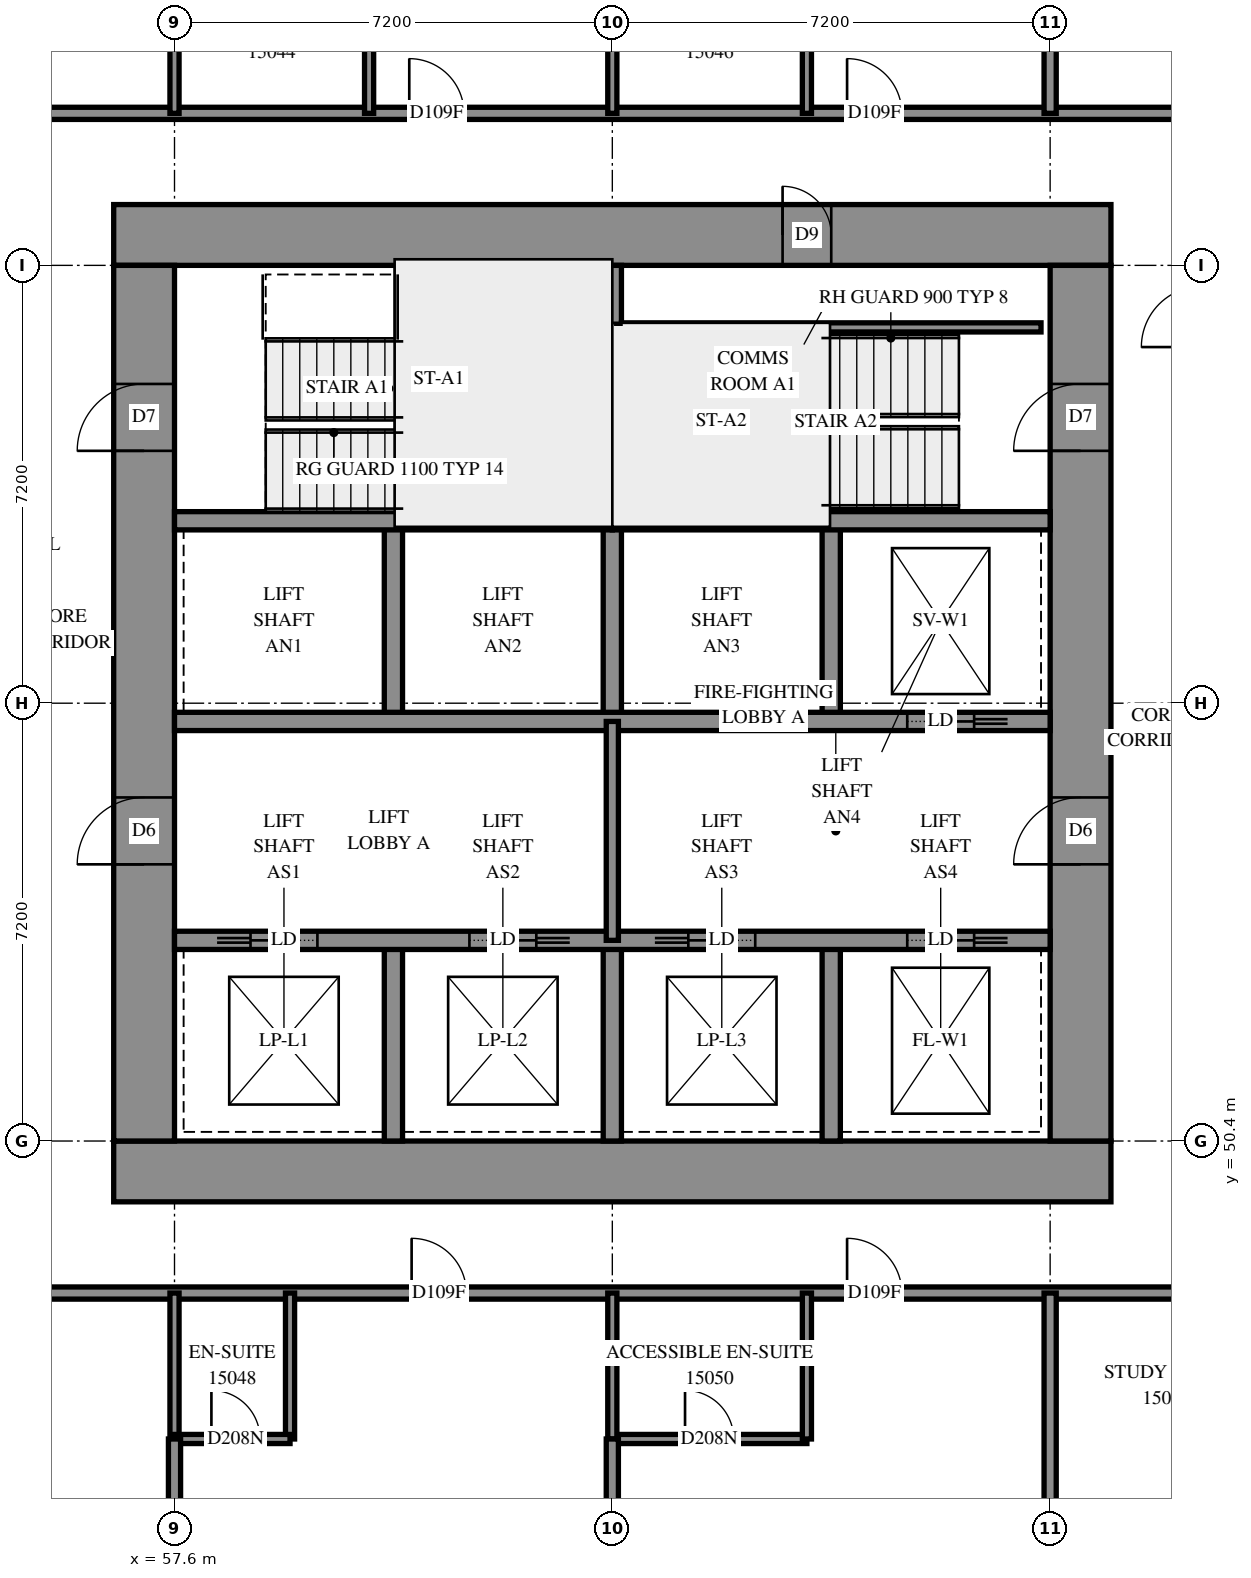
"""IFC4 building model, lengths in metres.
Left out: names, types, materials, properties, quantities, classifications, styles, units other than length and angle.
Written with IfcOpenShell. Run it as: python <this file> out.ifc"""

import sys

from ifc_helpers import new_model, si_unit, direction, frame, frame_2d, origin, place, context, subcontext, project, spatial, rectangle, extrude, element, fill, save


model = new_model("IFC4")
c1 = context("Model", 3, precision=1e-05, world=origin(), true_north=direction((0.0, 1.0)))
c2 = subcontext(c1, "Body", "Model", "MODEL_VIEW")
j1 = project(units=[si_unit("LENGTHUNIT", "METRE"), si_unit("PLANEANGLEUNIT", "RADIAN")], contexts=[c1])
p1 = place(None, origin())
s1 = spatial("IfcSite", under=j1, at=p1, CompositionType="ELEMENT")
p2 = place(p1, origin())
s2 = spatial("IfcBuilding", under=s1, at=p2, CompositionType="ELEMENT")
p3 = place(p2, frame((0.0, 0.0, 57.6)))
s3 = spatial("IfcBuildingStorey", under=s2, at=p3, CompositionType="ELEMENT", Elevation=57.6)
p4 = place(p3, frame((56.6, 49.9, -0.3), z_axis=(0.0, 0.0, 1.0), x_axis=(1.0, 0.0, 0.0)))
e1 = element("IfcWall", 1, at=p4, inside=s3, PredefinedType="SHEAR", context=c2, shape_type="SweptSolid", body=[
    extrude(rectangle(XDim=16.4, YDim=1.0, at=frame_2d((8.2, 0.0))), origin(), (0.0, 0.0, 1.0), 2.7),
])
p5 = place(p3, frame((56.6, 65.3, -0.3), z_axis=(0.0, 0.0, 1.0), x_axis=(1.0, 0.0, 0.0)))
e2 = element("IfcWall", 2, at=p5, inside=s3, PredefinedType="SHEAR", context=c2, shape_type="SweptSolid", body=[
    extrude(rectangle(XDim=16.4, YDim=1.0, at=frame_2d((8.2, 0.0))), origin(), (0.0, 0.0, 1.0), 2.7),
])
p6 = place(p5, frame((11.0, 0.0, 0.3)))
e3 = element("IfcOpeningElement", 3, at=p6, cuts=e2, PredefinedType="OPENING", context=c2, shape_type="SweptSolid", body=[
    extrude(rectangle(XDim=0.8, YDim=2.1, at=frame_2d((0.4, 1.05))), frame((0.0, 0.51, 0.0), z_axis=(0.0, -1.0, 0.0), x_axis=(1.0, 0.0, 0.0)), (0.0, 0.0, 1.0), 1.02),
])
p7 = place(p3, frame((57.1, 50.4, -0.3), z_axis=(0.0, 0.0, 1.0), x_axis=(0.0, 1.0, 0.0)))
e4 = element("IfcWall", 4, at=p7, inside=s3, PredefinedType="SHEAR", context=c2, shape_type="SweptSolid", body=[
    extrude(rectangle(XDim=14.4, YDim=1.0, at=frame_2d((7.2, 0.0))), origin(), (0.0, 0.0, 1.0), 2.7),
])
p8 = place(p7, frame((4.55, 0.0, 0.3)))
e5 = element("IfcOpeningElement", 5, at=p8, cuts=e4, PredefinedType="OPENING", context=c2, shape_type="SweptSolid", body=[
    extrude(rectangle(XDim=1.1, YDim=2.1, at=frame_2d((0.55, 1.05))), frame((0.0, 0.51, 0.0), z_axis=(0.0, -1.0, 0.0), x_axis=(1.0, 0.0, 0.0)), (0.0, 0.0, 1.0), 1.02),
])
p9 = place(p7, frame((11.35, 0.0, 0.3)))
e6 = element("IfcOpeningElement", 6, at=p9, cuts=e4, PredefinedType="OPENING", context=c2, shape_type="SweptSolid", body=[
    extrude(rectangle(XDim=1.1, YDim=2.1, at=frame_2d((0.55, 1.05))), frame((0.0, 0.51, 0.0), z_axis=(0.0, -1.0, 0.0), x_axis=(1.0, 0.0, 0.0)), (0.0, 0.0, 1.0), 1.02),
])
p10 = place(p3, frame((72.5, 50.4, -0.3), z_axis=(0.0, 0.0, 1.0), x_axis=(0.0, 1.0, 0.0)))
e7 = element("IfcWall", 7, at=p10, inside=s3, PredefinedType="SHEAR", context=c2, shape_type="SweptSolid", body=[
    extrude(rectangle(XDim=14.4, YDim=1.0, at=frame_2d((7.2, 0.0))), origin(), (0.0, 0.0, 1.0), 2.7),
])
p11 = place(p10, frame((4.55, 0.0, 0.3)))
e8 = element("IfcOpeningElement", 8, at=p11, cuts=e7, PredefinedType="OPENING", context=c2, shape_type="SweptSolid", body=[
    extrude(rectangle(XDim=1.1, YDim=2.1, at=frame_2d((0.55, 1.05))), frame((0.0, 0.51, 0.0), z_axis=(0.0, -1.0, 0.0), x_axis=(1.0, 0.0, 0.0)), (0.0, 0.0, 1.0), 1.02),
])
p12 = place(p10, frame((11.35, 0.0, 0.3)))
e9 = element("IfcOpeningElement", 9, at=p12, cuts=e7, PredefinedType="OPENING", context=c2, shape_type="SweptSolid", body=[
    extrude(rectangle(XDim=1.1, YDim=2.1, at=frame_2d((0.55, 1.05))), frame((0.0, 0.51, 0.0), z_axis=(0.0, -1.0, 0.0), x_axis=(1.0, 0.0, 0.0)), (0.0, 0.0, 1.0), 1.02),
])
for number, where, z_axis, x_axis in (
    (10, (61.2, 50.4, 0.0), (0.0, 0.0, 1.0), (0.0, 1.0, 0.0)),
    (11, (61.2, 57.3, 0.0), (0.0, 0.0, 1.0), (0.0, 1.0, 0.0)),
    (12, (64.8, 50.4, 0.0), (0.0, 0.0, 1.0), (0.0, 1.0, 0.0)),
    (13, (64.8, 57.3, 0.0), (0.0, 0.0, 1.0), (0.0, 1.0, 0.0)),
    (14, (68.4, 50.4, 0.0), (0.0, 0.0, 1.0), (0.0, 1.0, 0.0)),
    (15, (68.4, 57.3, 0.0), (0.0, 0.0, 1.0), (0.0, 1.0, 0.0)),
):
    element("IfcWall", number, at=place(p3, frame(where, z_axis=z_axis, x_axis=x_axis)), inside=s3, PredefinedType="SOLIDWALL", context=c2, shape_type="SweptSolid", body=[
        extrude(rectangle(XDim=3.3, YDim=0.3, at=frame_2d((1.65, 0.0))), origin(), (0.0, 0.0, 1.0), 3.1),
    ])
p13 = place(p3, frame((57.6, 53.7, 0.0), z_axis=(0.0, 0.0, 1.0), x_axis=(1.0, 0.0, 0.0)))
e16 = element("IfcWall", 16, at=p13, inside=s3, PredefinedType="SOLIDWALL", context=c2, shape_type="SweptSolid", body=[
    extrude(rectangle(XDim=14.4, YDim=0.3, at=frame_2d((7.2, 0.0))), origin(), (0.0, 0.0, 1.0), 3.1),
])
p14 = place(p13, frame((1.25, 0.0, 0.0)))
e17 = element("IfcOpeningElement", 17, at=p14, cuts=e16, PredefinedType="OPENING", context=c2, shape_type="SweptSolid", body=[
    extrude(rectangle(XDim=1.1, YDim=2.1, at=frame_2d((0.55, 1.05))), frame((0.0, 0.16, 0.0), z_axis=(0.0, -1.0, 0.0), x_axis=(1.0, 0.0, 0.0)), (0.0, 0.0, 1.0), 0.32),
])
p15 = place(p13, frame((4.85, 0.0, 0.0)))
e18 = element("IfcOpeningElement", 18, at=p15, cuts=e16, PredefinedType="OPENING", context=c2, shape_type="SweptSolid", body=[
    extrude(rectangle(XDim=1.1, YDim=2.1, at=frame_2d((0.55, 1.05))), frame((0.0, 0.16, 0.0), z_axis=(0.0, -1.0, 0.0), x_axis=(1.0, 0.0, 0.0)), (0.0, 0.0, 1.0), 0.32),
])
p16 = place(p13, frame((8.45, 0.0, 0.0)))
e19 = element("IfcOpeningElement", 19, at=p16, cuts=e16, PredefinedType="OPENING", context=c2, shape_type="SweptSolid", body=[
    extrude(rectangle(XDim=1.1, YDim=2.1, at=frame_2d((0.55, 1.05))), frame((0.0, 0.16, 0.0), z_axis=(0.0, -1.0, 0.0), x_axis=(1.0, 0.0, 0.0)), (0.0, 0.0, 1.0), 0.32),
])
p17 = place(p13, frame((12.05, 0.0, 0.0)))
e20 = element("IfcOpeningElement", 20, at=p17, cuts=e16, PredefinedType="OPENING", context=c2, shape_type="SweptSolid", body=[
    extrude(rectangle(XDim=1.1, YDim=2.1, at=frame_2d((0.55, 1.05))), frame((0.0, 0.16, 0.0), z_axis=(0.0, -1.0, 0.0), x_axis=(1.0, 0.0, 0.0)), (0.0, 0.0, 1.0), 0.32),
])
p18 = place(p3, frame((57.6, 57.3, 0.0), z_axis=(0.0, 0.0, 1.0), x_axis=(1.0, 0.0, 0.0)))
e21 = element("IfcWall", 21, at=p18, inside=s3, PredefinedType="SOLIDWALL", context=c2, shape_type="SweptSolid", body=[
    extrude(rectangle(XDim=14.4, YDim=0.3, at=frame_2d((7.2, 0.0))), origin(), (0.0, 0.0, 1.0), 3.1),
])
p19 = place(p18, frame((12.05, 0.0, 0.0)))
e22 = element("IfcOpeningElement", 22, at=p19, cuts=e21, PredefinedType="OPENING", context=c2, shape_type="SweptSolid", body=[
    extrude(rectangle(XDim=1.1, YDim=2.1, at=frame_2d((0.55, 1.05))), frame((0.0, 0.16, 0.0), z_axis=(0.0, -1.0, 0.0), x_axis=(1.0, 0.0, 0.0)), (0.0, 0.0, 1.0), 0.32),
])
for number, where, z_axis, x_axis in (
    (23, (57.6, 60.6, 0.0), (0.0, 0.0, 1.0), (1.0, 0.0, 0.0)),
    (24, (64.8, 60.6, 0.0), (0.0, 0.0, 1.0), (1.0, 0.0, 0.0)),
):
    element("IfcWall", number, at=place(p3, frame(where, z_axis=z_axis, x_axis=x_axis)), inside=s3, PredefinedType="SOLIDWALL", context=c2, shape_type="SweptSolid", body=[
        extrude(rectangle(XDim=7.2, YDim=0.3, at=frame_2d((3.6, 0.0))), origin(), (0.0, 0.0, 1.0), 3.1),
    ])
p20 = place(p3, frame((64.8, 60.6, 0.0), z_axis=(0.0, 0.0, 1.0), x_axis=(0.0, 1.0, 0.0)))
e25 = element("IfcWall", 25, at=p20, inside=s3, PredefinedType="SOLIDWALL", context=c2, shape_type="SweptSolid", body=[
    extrude(rectangle(XDim=4.2, YDim=0.3, at=frame_2d((2.1, 0.0))), origin(), (0.0, 0.0, 1.0), 3.1),
])
p21 = place(p3, frame((64.95, 63.78, 0.0), z_axis=(0.0, 0.0, 1.0), x_axis=(1.0, 0.0, 0.0)))
e26 = element("IfcWall", 26, at=p21, inside=s3, PredefinedType="PARTITIONING", context=c2, shape_type="SweptSolid", body=[
    extrude(rectangle(XDim=6.9, YDim=0.15, at=frame_2d((3.45, 0.0))), origin(), (0.0, 0.0, 1.0), 3.1),
])
p22 = place(p3, frame((64.8, 53.7, 0.0), z_axis=(0.0, 0.0, 1.0), x_axis=(0.0, 1.0, 0.0)))
e27 = element("IfcWall", 27, at=p22, inside=s3, PredefinedType="PARTITIONING", context=c2, shape_type="SweptSolid", body=[
    extrude(rectangle(XDim=3.6, YDim=0.2, at=frame_2d((1.8, 0.0))), origin(), (0.0, 0.0, 1.0), 3.1),
])
p23 = place(p3, frame((55.1, 67.3, 0.0), z_axis=(0.0, 0.0, 1.0), x_axis=(1.0, 0.0, 0.0)))
e28 = element("IfcWall", 28, at=p23, inside=s3, PredefinedType="PARTITIONING", context=c2, shape_type="SweptSolid", body=[
    extrude(rectangle(XDim=19.4, YDim=0.2, at=frame_2d((9.7, 0.0))), origin(), (0.0, 0.0, 1.0), 3.1),
])
p24 = place(p23, frame((6.361, 0.0, 0.0)))
e29 = element("IfcOpeningElement", 29, at=p24, cuts=e28, PredefinedType="OPENING", context=c2, shape_type="SweptSolid", body=[
    extrude(rectangle(XDim=0.9, YDim=2.1, at=frame_2d((0.45, 1.05))), frame((0.0, 0.11, 0.0), z_axis=(0.0, -1.0, 0.0), x_axis=(1.0, 0.0, 0.0)), (0.0, 0.0, 1.0), 0.22),
])
p25 = place(p23, frame((13.561, 0.0, 0.0)))
e30 = element("IfcOpeningElement", 30, at=p25, cuts=e28, PredefinedType="OPENING", context=c2, shape_type="SweptSolid", body=[
    extrude(rectangle(XDim=0.9, YDim=2.1, at=frame_2d((0.45, 1.05))), frame((0.0, 0.11, 0.0), z_axis=(0.0, -1.0, 0.0), x_axis=(1.0, 0.0, 0.0)), (0.0, 0.0, 1.0), 0.22),
])
p26 = place(p3, frame((55.1, 47.9, 0.0), z_axis=(0.0, 0.0, 1.0), x_axis=(1.0, 0.0, 0.0)))
e31 = element("IfcWall", 31, at=p26, inside=s3, PredefinedType="PARTITIONING", context=c2, shape_type="SweptSolid", body=[
    extrude(rectangle(XDim=19.208, YDim=0.2, at=frame_2d((9.604, 0.0))), origin(), (0.0, 0.0, 1.0), 3.1),
])
p27 = place(p26, frame((6.399, 0.0, 0.0)))
e32 = element("IfcOpeningElement", 32, at=p27, cuts=e31, PredefinedType="OPENING", context=c2, shape_type="SweptSolid", body=[
    extrude(rectangle(XDim=0.9, YDim=2.1, at=frame_2d((0.45, 1.05))), frame((0.0, 0.11, 0.0), z_axis=(0.0, -1.0, 0.0), x_axis=(1.0, 0.0, 0.0)), (0.0, 0.0, 1.0), 0.22),
])
p28 = place(p26, frame((13.561, 0.0, 0.0)))
e33 = element("IfcOpeningElement", 33, at=p28, cuts=e31, PredefinedType="OPENING", context=c2, shape_type="SweptSolid", body=[
    extrude(rectangle(XDim=0.9, YDim=2.1, at=frame_2d((0.45, 1.05))), frame((0.0, 0.11, 0.0), z_axis=(0.0, -1.0, 0.0), x_axis=(1.0, 0.0, 0.0)), (0.0, 0.0, 1.0), 0.22),
])
for number, where, z_axis, x_axis in (
    (34, (72.0, 67.3, 0.0), (0.0, 0.0, 1.0), (0.0, 1.0, 0.0)),
    (35, (72.0, 43.8, 0.0), (0.0, 0.0, 1.0), (0.0, 1.0, 0.0)),
):
    element("IfcWall", number, at=place(p3, frame(where, z_axis=z_axis, x_axis=x_axis)), inside=s3, PredefinedType="PARTITIONING", context=c2, shape_type="SweptSolid", body=[
        extrude(rectangle(XDim=4.1, YDim=0.2, at=frame_2d((2.05, 0.0))), origin(), (0.0, 0.0, 1.0), 3.1),
    ])
p29 = place(p3, frame((64.8, 45.5, 0.0), z_axis=(0.0, 0.0, 1.0), x_axis=(1.0, 0.0, 0.0)))
e36 = element("IfcWall", 36, at=p29, inside=s3, PredefinedType="PARTITIONING", context=c2, shape_type="SweptSolid", body=[
    extrude(rectangle(XDim=3.2, YDim=0.15, at=frame_2d((1.6, 0.0))), origin(), (0.0, 0.0, 1.0), 3.1),
])
p30 = place(p29, frame((1.196, 0.0, 0.0)))
e37 = element("IfcOpeningElement", 37, at=p30, cuts=e36, PredefinedType="OPENING", context=c2, shape_type="SweptSolid", body=[
    extrude(rectangle(XDim=0.8, YDim=2.1, at=frame_2d((0.4, 1.05))), frame((0.0, 0.085, 0.0), z_axis=(0.0, -1.0, 0.0), x_axis=(1.0, 0.0, 0.0)), (0.0, 0.0, 1.0), 0.17),
])
for number, where, z_axis, x_axis in (
    (38, (57.6, 67.3, 0.0), (0.0, 0.0, 1.0), (0.0, 1.0, 0.0)),
    (39, (60.8, 67.3, 0.0), (0.0, 0.0, 1.0), (0.0, 1.0, 0.0)),
    (40, (68.0, 67.3, 0.0), (0.0, 0.0, 1.0), (0.0, 1.0, 0.0)),
    (41, (64.8, 67.3, 0.0), (0.0, 0.0, 1.0), (0.0, 1.0, 0.0)),
    (42, (59.5, 45.5, 0.0), (0.0, 0.0, 1.0), (0.0, 1.0, 0.0)),
    (43, (57.6, 45.5, 0.0), (0.0, 0.0, 1.0), (0.0, 1.0, 0.0)),
    (44, (68.0, 45.5, 0.0), (0.0, 0.0, 1.0), (0.0, 1.0, 0.0)),
    (45, (64.8, 45.5, 0.0), (0.0, 0.0, 1.0), (0.0, 1.0, 0.0)),
):
    element("IfcWall", number, at=place(p3, frame(where, z_axis=z_axis, x_axis=x_axis)), inside=s3, PredefinedType="PARTITIONING", context=c2, shape_type="SweptSolid", body=[
        extrude(rectangle(XDim=2.4, YDim=0.15, at=frame_2d((1.2, 0.0))), origin(), (0.0, 0.0, 1.0), 3.1),
    ])
p31 = place(p3, frame((57.6, 45.5, 0.0), z_axis=(0.0, 0.0, 1.0), x_axis=(1.0, 0.0, 0.0)))
e46 = element("IfcWall", 46, at=p31, inside=s3, PredefinedType="PARTITIONING", context=c2, shape_type="SweptSolid", body=[
    extrude(rectangle(XDim=1.9, YDim=0.15, at=frame_2d((0.95, 0.0))), origin(), (0.0, 0.0, 1.0), 3.1),
])
p32 = place(p31, frame((0.607, 0.0, 0.0)))
e47 = element("IfcOpeningElement", 47, at=p32, cuts=e46, PredefinedType="OPENING", context=c2, shape_type="SweptSolid", body=[
    extrude(rectangle(XDim=0.8, YDim=2.1, at=frame_2d((0.4, 1.05))), frame((0.0, 0.085, 0.0), z_axis=(0.0, -1.0, 0.0), x_axis=(1.0, 0.0, 0.0)), (0.0, 0.0, 1.0), 0.17),
])
for number, where, z_axis, x_axis in (
    (48, (57.6, 43.8, 0.0), (0.0, 0.0, 1.0), (0.0, 1.0, 0.0)),
    (49, (64.8, 43.8, 0.0), (0.0, 0.0, 1.0), (0.0, 1.0, 0.0)),
):
    element("IfcWall", number, at=place(p3, frame(where, z_axis=z_axis, x_axis=x_axis)), inside=s3, PredefinedType="PARTITIONING", context=c2, shape_type="SweptSolid", body=[
        extrude(rectangle(XDim=1.7, YDim=0.2, at=frame_2d((0.85, 0.0))), origin(), (0.0, 0.0, 1.0), 3.1),
    ])
p33 = place(p6, origin())
e50 = element("IfcDoor", 50, at=p33, inside=s3, OperationType="SINGLE_SWING_RIGHT", PredefinedType="DOOR", context=c2, shape_type="SweptSolid", body=[
    extrude(rectangle(XDim=0.8, YDim=2.1, at=frame_2d((0.4, 1.05))), frame((0.0, -0.44, 0.0), z_axis=(0.0, -1.0, 0.0), x_axis=(1.0, 0.0, 0.0)), (0.0, 0.0, 1.0), 0.05),
])
fill(e3, e50)
p34 = place(p8, origin())
e51 = element("IfcDoor", 51, at=p34, inside=s3, OperationType="DOUBLE_DOOR_SINGLE_SWING", PredefinedType="DOOR", context=c2, shape_type="SweptSolid", body=[
    extrude(rectangle(XDim=1.1, YDim=2.1, at=frame_2d((0.55, 1.05))), frame((0.0, 0.025, 0.0), z_axis=(0.0, -1.0, 0.0), x_axis=(1.0, 0.0, 0.0)), (0.0, 0.0, 1.0), 0.05),
])
fill(e5, e51)
p35 = place(p11, origin())
e52 = element("IfcDoor", 52, at=p35, inside=s3, OperationType="DOUBLE_DOOR_SINGLE_SWING", PredefinedType="DOOR", context=c2, shape_type="SweptSolid", body=[
    extrude(rectangle(XDim=1.1, YDim=2.1, at=frame_2d((0.55, 1.05))), frame((0.0, 0.025, 0.0), z_axis=(0.0, -1.0, 0.0), x_axis=(1.0, 0.0, 0.0)), (0.0, 0.0, 1.0), 0.05),
])
fill(e8, e52)
p36 = place(p9, origin())
e53 = element("IfcDoor", 53, at=p36, inside=s3, OperationType="SINGLE_SWING_LEFT", PredefinedType="DOOR", context=c2, shape_type="SweptSolid", body=[
    extrude(rectangle(XDim=1.1, YDim=2.1, at=frame_2d((0.55, 1.05))), frame((0.0, 0.025, 0.0), z_axis=(0.0, -1.0, 0.0), x_axis=(1.0, 0.0, 0.0)), (0.0, 0.0, 1.0), 0.05),
])
fill(e6, e53)
p37 = place(p12, origin())
e54 = element("IfcDoor", 54, at=p37, inside=s3, OperationType="SINGLE_SWING_RIGHT", PredefinedType="DOOR", context=c2, shape_type="SweptSolid", body=[
    extrude(rectangle(XDim=1.1, YDim=2.1, at=frame_2d((0.55, 1.05))), frame((0.0, 0.025, 0.0), z_axis=(0.0, -1.0, 0.0), x_axis=(1.0, 0.0, 0.0)), (0.0, 0.0, 1.0), 0.05),
])
fill(e9, e54)
p38 = place(p14, origin())
e55 = element("IfcDoor", 55, at=p38, inside=s3, OperationType="SLIDING_TO_LEFT", PredefinedType="DOOR", context=c2, shape_type="SweptSolid", body=[
    extrude(rectangle(XDim=1.1, YDim=2.1, at=frame_2d((0.55, 1.05))), frame((0.0, 0.025, 0.0), z_axis=(0.0, -1.0, 0.0), x_axis=(1.0, 0.0, 0.0)), (0.0, 0.0, 1.0), 0.05),
])
fill(e17, e55)
p39 = place(p15, origin())
e56 = element("IfcDoor", 56, at=p39, inside=s3, OperationType="SLIDING_TO_RIGHT", PredefinedType="DOOR", context=c2, shape_type="SweptSolid", body=[
    extrude(rectangle(XDim=1.1, YDim=2.1, at=frame_2d((0.55, 1.05))), frame((0.0, 0.025, 0.0), z_axis=(0.0, -1.0, 0.0), x_axis=(1.0, 0.0, 0.0)), (0.0, 0.0, 1.0), 0.05),
])
fill(e18, e56)
p40 = place(p16, origin())
e57 = element("IfcDoor", 57, at=p40, inside=s3, OperationType="SLIDING_TO_LEFT", PredefinedType="DOOR", context=c2, shape_type="SweptSolid", body=[
    extrude(rectangle(XDim=1.1, YDim=2.1, at=frame_2d((0.55, 1.05))), frame((0.0, 0.025, 0.0), z_axis=(0.0, -1.0, 0.0), x_axis=(1.0, 0.0, 0.0)), (0.0, 0.0, 1.0), 0.05),
])
fill(e19, e57)
p41 = place(p17, origin())
e58 = element("IfcDoor", 58, at=p41, inside=s3, OperationType="SLIDING_TO_RIGHT", PredefinedType="DOOR", context=c2, shape_type="SweptSolid", body=[
    extrude(rectangle(XDim=1.1, YDim=2.1, at=frame_2d((0.55, 1.05))), frame((0.0, 0.025, 0.0), z_axis=(0.0, -1.0, 0.0), x_axis=(1.0, 0.0, 0.0)), (0.0, 0.0, 1.0), 0.05),
])
fill(e20, e58)
p42 = place(p19, origin())
e59 = element("IfcDoor", 59, at=p42, inside=s3, OperationType="SLIDING_TO_RIGHT", PredefinedType="DOOR", context=c2, shape_type="SweptSolid", body=[
    extrude(rectangle(XDim=1.1, YDim=2.1, at=frame_2d((0.55, 1.05))), frame((0.0, 0.025, 0.0), z_axis=(0.0, -1.0, 0.0), x_axis=(1.0, 0.0, 0.0)), (0.0, 0.0, 1.0), 0.05),
])
fill(e22, e59)
p43 = place(p24, origin())
e60 = element("IfcDoor", 60, at=p43, inside=s3, OperationType="SINGLE_SWING_RIGHT", PredefinedType="DOOR", context=c2, shape_type="SweptSolid", body=[
    extrude(rectangle(XDim=0.9, YDim=2.1, at=frame_2d((0.45, 1.05))), frame((0.0, 0.025, 0.0), z_axis=(0.0, -1.0, 0.0), x_axis=(1.0, 0.0, 0.0)), (0.0, 0.0, 1.0), 0.05),
])
fill(e29, e60)
p44 = place(p25, origin())
e61 = element("IfcDoor", 61, at=p44, inside=s3, OperationType="SINGLE_SWING_RIGHT", PredefinedType="DOOR", context=c2, shape_type="SweptSolid", body=[
    extrude(rectangle(XDim=0.9, YDim=2.1, at=frame_2d((0.45, 1.05))), frame((0.0, 0.025, 0.0), z_axis=(0.0, -1.0, 0.0), x_axis=(1.0, 0.0, 0.0)), (0.0, 0.0, 1.0), 0.05),
])
fill(e30, e61)
p45 = place(p27, origin())
e62 = element("IfcDoor", 62, at=p45, inside=s3, OperationType="SINGLE_SWING_LEFT", PredefinedType="DOOR", context=c2, shape_type="SweptSolid", body=[
    extrude(rectangle(XDim=0.9, YDim=2.1, at=frame_2d((0.45, 1.05))), frame((0.0, 0.025, 0.0), z_axis=(0.0, -1.0, 0.0), x_axis=(1.0, 0.0, 0.0)), (0.0, 0.0, 1.0), 0.05),
])
fill(e32, e62)
p46 = place(p32, origin())
e63 = element("IfcDoor", 63, at=p46, inside=s3, OperationType="SINGLE_SWING_RIGHT", PredefinedType="DOOR", context=c2, shape_type="SweptSolid", body=[
    extrude(rectangle(XDim=0.8, YDim=2.1, at=frame_2d((0.4, 1.05))), frame((0.0, 0.025, 0.0), z_axis=(0.0, -1.0, 0.0), x_axis=(1.0, 0.0, 0.0)), (0.0, 0.0, 1.0), 0.05),
])
fill(e47, e63)
p47 = place(p28, origin())
e64 = element("IfcDoor", 64, at=p47, inside=s3, OperationType="SINGLE_SWING_LEFT", PredefinedType="DOOR", context=c2, shape_type="SweptSolid", body=[
    extrude(rectangle(XDim=0.9, YDim=2.1, at=frame_2d((0.45, 1.05))), frame((0.0, 0.025, 0.0), z_axis=(0.0, -1.0, 0.0), x_axis=(1.0, 0.0, 0.0)), (0.0, 0.0, 1.0), 0.05),
])
fill(e33, e64)
p48 = place(p30, origin())
e65 = element("IfcDoor", 65, at=p48, inside=s3, OperationType="SINGLE_SWING_RIGHT", PredefinedType="DOOR", context=c2, shape_type="SweptSolid", body=[
    extrude(rectangle(XDim=0.8, YDim=2.1, at=frame_2d((0.4, 1.05))), frame((0.0, 0.025, 0.0), z_axis=(0.0, -1.0, 0.0), x_axis=(1.0, 0.0, 0.0)), (0.0, 0.0, 1.0), 0.05),
])
fill(e37, e65)
save(model, sys.argv[1])
